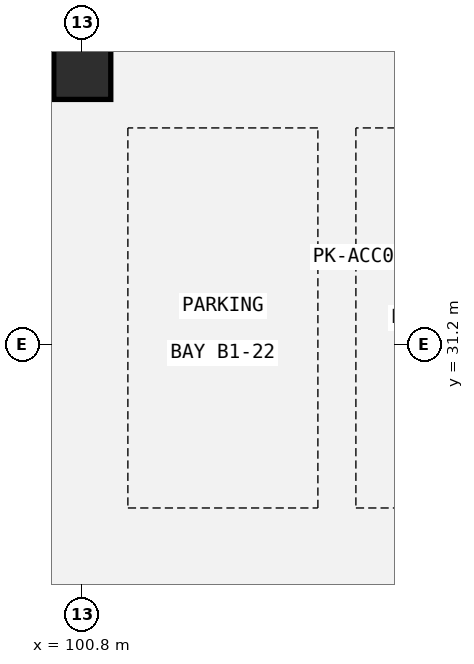
"""IFC4 building model, lengths in metres.
Left out: names, types, materials, properties, quantities, classifications, styles, units other than length and angle.
Written with IfcOpenShell. Run it as: python <this file> out.ifc"""

import sys

from ifc_helpers import new_model, si_unit, direction, frame, origin, origin_2d, place, context, subcontext, project, spatial, rectangle, extrude, element, save


model = new_model("IFC4")
c1 = context("Model", 3, precision=1e-05, world=origin(), true_north=direction((0.0, 1.0)))
c2 = subcontext(c1, "Body", "Model", "MODEL_VIEW")
j1 = project(units=[si_unit("LENGTHUNIT", "METRE"), si_unit("PLANEANGLEUNIT", "RADIAN")], contexts=[c1])
p1 = place(None, origin())
s1 = spatial("IfcSite", under=j1, at=p1, CompositionType="ELEMENT")
p2 = place(p1, origin())
s2 = spatial("IfcBuilding", under=s1, at=p2, CompositionType="ELEMENT")
p3 = place(p2, frame((0.0, 0.0, -4.5)))
s3 = spatial("IfcBuildingStorey", under=s2, at=p3, CompositionType="ELEMENT", Elevation=-4.5)
p4 = place(p3, frame((100.8, 34.8, 0.0), z_axis=(0.0, 0.0, 1.0), x_axis=(1.0, 0.0, 0.0)))
e1 = element("IfcColumn", 1, at=p4, inside=s3, PredefinedType="COLUMN", context=c2, shape_type="SweptSolid", body=[
    extrude(rectangle(XDim=0.75, YDim=0.75, at=origin_2d()), origin(), (0.0, 0.0, 1.0), 4.5),
])
save(model, sys.argv[1])
